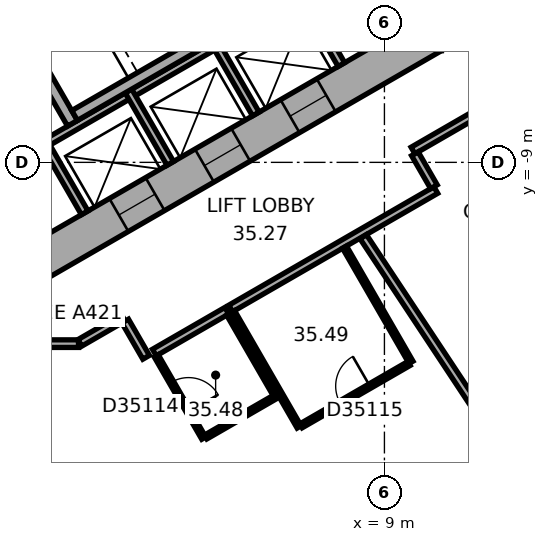
"""IFC4 building model, lengths in metres.
Left out: names, types, materials, properties, quantities, classifications, styles, units other than length and angle.
Written with IfcOpenShell. Run it as: python <this file> out.ifc"""

import sys

from ifc_helpers import new_model, si_unit, direction, frame, frame_2d, origin, place, context, subcontext, project, spatial, rectangle, extrude, element, fill, save


model = new_model("IFC4")
c1 = context("Model", 3, precision=1e-05, world=origin(), true_north=direction((0.0, 1.0)))
c2 = subcontext(c1, "Body", "Model", "MODEL_VIEW")
j1 = project(units=[si_unit("LENGTHUNIT", "METRE"), si_unit("PLANEANGLEUNIT", "RADIAN")], contexts=[c1])
p1 = place(None, origin())
s1 = spatial("IfcSite", under=j1, at=p1, CompositionType="ELEMENT")
p2 = place(p1, origin())
s2 = spatial("IfcBuilding", under=s1, at=p2, CompositionType="ELEMENT")
p3 = place(p2, frame((0.0, 0.0, 146.6)))
s3 = spatial("IfcBuildingStorey", under=s2, at=p3, CompositionType="ELEMENT", Elevation=146.6)
p4 = place(p3, frame((-10.25, -5.629, 0.0), z_axis=(0.0, 0.0, 1.0), x_axis=(0.866022616891, -0.50000482701, 0.0)))
e1 = element("IfcWall", 1, at=p4, inside=s3, PredefinedType="SHEAR", context=c2, shape_type="SweptSolid", body=[
    extrude(rectangle(XDim=12.125, YDim=1.0, at=frame_2d((6.062, 0.0))), origin(), (0.0, 0.0, 1.0), 3.7),
])
p5 = place(p4, frame((6.262, 0.0, 0.0)))
e2 = element("IfcOpeningElement", 2, at=p5, cuts=e1, PredefinedType="OPENING", context=c2, shape_type="SweptSolid", body=[
    extrude(rectangle(XDim=1.5, YDim=2.1, at=frame_2d((0.75, 1.05))), frame((0.0, 0.51, 0.0), z_axis=(0.0, -1.0, 0.0), x_axis=(1.0, 0.0, 0.0)), (0.0, 0.0, 1.0), 1.02),
])
p6 = place(p4, frame((1.712, 0.0, 0.0)))
e3 = element("IfcOpeningElement", 3, at=p6, cuts=e1, PredefinedType="OPENING", context=c2, shape_type="SweptSolid", body=[
    extrude(rectangle(XDim=1.1, YDim=2.1, at=frame_2d((0.55, 1.05))), frame((0.0, 0.51, 0.0), z_axis=(0.0, -1.0, 0.0), x_axis=(1.0, 0.0, 0.0)), (0.0, 0.0, 1.0), 1.02),
])
p7 = place(p4, frame((4.312, 0.0, 0.0)))
e4 = element("IfcOpeningElement", 4, at=p7, cuts=e1, PredefinedType="OPENING", context=c2, shape_type="SweptSolid", body=[
    extrude(rectangle(XDim=1.1, YDim=2.1, at=frame_2d((0.55, 1.05))), frame((0.0, 0.51, 0.0), z_axis=(0.0, -1.0, 0.0), x_axis=(1.0, 0.0, 0.0)), (0.0, 0.0, 1.0), 1.02),
])
p8 = place(p3, frame((-0.25, -11.691, 0.0), z_axis=(0.0, 0.0, 1.0), x_axis=(0.866022616891, 0.50000482701, 0.0)))
e5 = element("IfcWall", 5, at=p8, inside=s3, PredefinedType="SHEAR", context=c2, shape_type="SweptSolid", body=[
    extrude(rectangle(XDim=12.125, YDim=1.0, at=frame_2d((6.062, 0.0))), origin(), (0.0, 0.0, 1.0), 3.7),
])
p9 = place(p8, frame((2.612, 0.0, 0.0)))
e6 = element("IfcOpeningElement", 6, at=p9, cuts=e5, PredefinedType="OPENING", context=c2, shape_type="SweptSolid", body=[
    extrude(rectangle(XDim=1.1, YDim=2.1, at=frame_2d((0.55, 1.05))), frame((0.0, 0.51, 0.0), z_axis=(0.0, -1.0, 0.0), x_axis=(1.0, 0.0, 0.0)), (0.0, 0.0, 1.0), 1.02),
])
p10 = place(p8, frame((5.212, 0.0, 0.0)))
e7 = element("IfcOpeningElement", 7, at=p10, cuts=e5, PredefinedType="OPENING", context=c2, shape_type="SweptSolid", body=[
    extrude(rectangle(XDim=1.1, YDim=2.1, at=frame_2d((0.55, 1.05))), frame((0.0, 0.51, 0.0), z_axis=(0.0, -1.0, 0.0), x_axis=(1.0, 0.0, 0.0)), (0.0, 0.0, 1.0), 1.02),
])
p11 = place(p8, frame((7.812, 0.0, 0.0)))
e8 = element("IfcOpeningElement", 8, at=p11, cuts=e5, PredefinedType="OPENING", context=c2, shape_type="SweptSolid", body=[
    extrude(rectangle(XDim=1.1, YDim=2.1, at=frame_2d((0.55, 1.05))), frame((0.0, 0.51, 0.0), z_axis=(0.0, -1.0, 0.0), x_axis=(1.0, 0.0, 0.0)), (0.0, 0.0, 1.0), 1.02),
])
p12 = place(p3, frame((2.911, -24.156, 0.0), z_axis=(0.0, 0.0, 1.0), x_axis=(0.833882163564, 0.551942512668, 0.0)))
e9 = element("IfcWall", 9, at=p12, inside=s3, PredefinedType="STANDARD", context=c2, shape_type="SweptSolid", body=[
    extrude(rectangle(XDim=20.044, YDim=0.2, at=frame_2d((10.022, 0.0))), origin(), (0.0, 0.0, 1.0), 3.7),
])
p13 = place(p12, frame((1.313, 0.0, 0.9)))
e10 = element("IfcOpeningElement", 10, at=p13, cuts=e9, PredefinedType="OPENING", context=c2, shape_type="SweptSolid", body=[
    extrude(rectangle(XDim=2.4, YDim=2.0, at=frame_2d((1.2, 1.0))), frame((0.0, 0.11, 0.0), z_axis=(0.0, -1.0, 0.0), x_axis=(1.0, 0.0, 0.0)), (0.0, 0.0, 1.0), 0.22),
])
p14 = place(p12, frame((5.067, 0.0, 0.9)))
e11 = element("IfcOpeningElement", 11, at=p14, cuts=e9, PredefinedType="OPENING", context=c2, shape_type="SweptSolid", body=[
    extrude(rectangle(XDim=2.4, YDim=2.0, at=frame_2d((1.2, 1.0))), frame((0.0, 0.11, 0.0), z_axis=(0.0, -1.0, 0.0), x_axis=(1.0, 0.0, 0.0)), (0.0, 0.0, 1.0), 0.22),
])
p15 = place(p12, frame((8.821, 0.0, 0.9)))
e12 = element("IfcOpeningElement", 12, at=p15, cuts=e9, PredefinedType="OPENING", context=c2, shape_type="SweptSolid", body=[
    extrude(rectangle(XDim=2.4, YDim=2.0, at=frame_2d((1.2, 1.0))), frame((0.0, 0.11, 0.0), z_axis=(0.0, -1.0, 0.0), x_axis=(1.0, 0.0, 0.0)), (0.0, 0.0, 1.0), 0.22),
])
p16 = place(p12, frame((12.575, 0.0, 0.9)))
e13 = element("IfcOpeningElement", 13, at=p16, cuts=e9, PredefinedType="OPENING", context=c2, shape_type="SweptSolid", body=[
    extrude(rectangle(XDim=2.4, YDim=2.0, at=frame_2d((1.2, 1.0))), frame((0.0, 0.11, 0.0), z_axis=(0.0, -1.0, 0.0), x_axis=(1.0, 0.0, 0.0)), (0.0, 0.0, 1.0), 0.22),
])
p17 = place(p12, frame((16.329, 0.0, 0.9)))
e14 = element("IfcOpeningElement", 14, at=p17, cuts=e9, PredefinedType="OPENING", context=c2, shape_type="SweptSolid", body=[
    extrude(rectangle(XDim=2.4, YDim=2.0, at=frame_2d((1.2, 1.0))), frame((0.0, 0.11, 0.0), z_axis=(0.0, -1.0, 0.0), x_axis=(1.0, 0.0, 0.0)), (0.0, 0.0, 1.0), 0.22),
])
p18 = place(p3, frame((-0.024, -8.559, 0.0), z_axis=(0.0, 0.0, 1.0), x_axis=(0.866026010844, 0.49999894854, 0.0)))
e15 = element("IfcWall", 15, at=p18, inside=s3, PredefinedType="PARTITIONING", context=c2, shape_type="SweptSolid", body=[
    extrude(rectangle(XDim=8.0, YDim=0.2, at=frame_2d((4.0, 0.0))), origin(), (0.0, 0.0, 1.0), 3.42),
])
for number, where, z_axis, x_axis in (
    (16, (0.013, -8.422, 0.0), (0.0, 0.0, 1.0), (0.5, -0.866, 0.0)),
    (17, (2.264, -7.122, 0.0), (0.0, 0.0, 1.0), (0.5, -0.866, 0.0)),
    (18, (4.516, -5.822, 0.0), (0.0, 0.0, 1.0), (0.5, -0.866, 0.0)),
    (19, (6.768, -4.522, 0.0), (0.0, 0.0, 1.0), (0.5, -0.866, 0.0)),
):
    element("IfcWall", number, at=place(p3, frame(where, z_axis=z_axis, x_axis=x_axis)), inside=s3, PredefinedType="PARTITIONING", context=c2, shape_type="SweptSolid", body=[
        extrude(rectangle(XDim=2.2, YDim=0.2, at=frame_2d((1.1, 0.0))), origin(), (0.0, 0.0, 1.0), 3.42),
    ])
p19 = place(p3, frame((-1.558, -3.902, 0.0), z_axis=(0.0, 0.0, 1.0), x_axis=(0.499977259774, -0.866038532462, 0.0)))
e20 = element("IfcWall", 20, at=p19, inside=s3, PredefinedType="SHEAR", context=c2, shape_type="SweptSolid", body=[
    extrude(rectangle(XDim=4.7, YDim=0.3, at=frame_2d((2.35, 0.0))), origin(), (0.0, 0.0, 1.0), 3.42),
])
p20 = place(p19, frame((0.8, 0.0, 0.0)))
e21 = element("IfcOpeningElement", 21, at=p20, cuts=e20, PredefinedType="OPENING", context=c2, shape_type="SweptSolid", body=[
    extrude(rectangle(XDim=1.2, YDim=2.1, at=frame_2d((0.6, 1.05))), frame((0.0, 0.16, 0.0), z_axis=(0.0, -1.0, 0.0), x_axis=(1.0, 0.0, 0.0)), (0.0, 0.0, 1.0), 0.32),
])
p21 = place(p3, frame((0.847, -7.767, 0.0), z_axis=(0.0, 0.0, 1.0), x_axis=(0.866027801685, 0.499995846692, 0.0)))
e22 = element("IfcWall", 22, at=p21, inside=s3, PredefinedType="SHEAR", context=c2, shape_type="SweptSolid", body=[
    extrude(rectangle(XDim=7.06, YDim=0.3, at=frame_2d((3.53, 0.0))), origin(), (0.0, 0.0, 1.0), 3.42),
])
p22 = place(p3, frame((-0.91, -13.77, 0.0), z_axis=(0.0, 0.0, 1.0), x_axis=(1.0, 0.0, 0.0)))
e23 = element("IfcWall", 23, at=p22, inside=s3, PredefinedType="PARTITIONING", context=c2, shape_type="SweptSolid", body=[
    extrude(rectangle(XDim=1.86, YDim=0.2, at=frame_2d((0.93, 0.0))), origin(), (0.0, 0.0, 1.0), 3.42),
])
p23 = place(p3, frame((0.985, -13.75, 0.0), z_axis=(0.0, 0.0, 1.0), x_axis=(0.866028661061, 0.499994358189, 0.0)))
e24 = element("IfcWall", 24, at=p23, inside=s3, PredefinedType="PARTITIONING", context=c2, shape_type="SweptSolid", body=[
    extrude(rectangle(XDim=1.321, YDim=0.2, at=frame_2d((0.661, 0.0))), origin(), (0.0, 0.0, 1.0), 3.42),
])
p24 = place(p3, frame((2.179, -13.176, 0.0), z_axis=(0.0, 0.0, 1.0), x_axis=(0.499978356969, -0.866037899034, 0.0)))
e25 = element("IfcWall", 25, at=p24, inside=s3, PredefinedType="PARTITIONING", context=c2, shape_type="SweptSolid", body=[
    extrude(rectangle(XDim=1.101, YDim=0.2, at=frame_2d((0.551, 0.0))), origin(), (0.0, 0.0, 1.0), 3.42),
])
p25 = place(p3, frame((2.946, -14.004, 0.0), z_axis=(0.0, 0.0, 1.0), x_axis=(0.866008176907, 0.50002983664, 0.0)))
e26 = element("IfcWall", 26, at=p25, inside=s3, PredefinedType="PARTITIONING", context=c2, shape_type="SweptSolid", body=[
    extrude(rectangle(XDim=2.2, YDim=0.2, at=frame_2d((1.1, 0.0))), origin(), (0.0, 0.0, 1.0), 3.42),
])
p26 = place(p3, frame((4.246, -16.256, 0.0), z_axis=(0.0, 0.0, 1.0), x_axis=(-0.499961950354, 0.866047370643, 0.0)))
e27 = element("IfcWall", 27, at=p26, inside=s3, PredefinedType="PARTITIONING", context=c2, shape_type="SweptSolid", body=[
    extrude(rectangle(XDim=2.5, YDim=0.12, at=frame_2d((1.25, 0.0))), origin(), (0.0, 0.0, 1.0), 3.42),
])
p27 = place(p26, frame((0.8, 0.0, 0.0)))
e28 = element("IfcOpeningElement", 28, at=p27, cuts=e27, PredefinedType="OPENING", context=c2, shape_type="SweptSolid", body=[
    extrude(rectangle(XDim=0.9, YDim=2.1, at=frame_2d((0.45, 1.05))), frame((0.0, 0.07, 0.0), z_axis=(0.0, -1.0, 0.0), x_axis=(1.0, 0.0, 0.0)), (0.0, 0.0, 1.0), 0.14),
])
p28 = place(p3, frame((4.901, -12.991, 0.0), z_axis=(0.0, 0.0, 1.0), x_axis=(0.500004234368, -0.866022959057, 0.0)))
e29 = element("IfcWall", 29, at=p28, inside=s3, PredefinedType="PARTITIONING", context=c2, shape_type="SweptSolid", body=[
    extrude(rectangle(XDim=2.5, YDim=0.12, at=frame_2d((1.25, 0.0))), origin(), (0.0, 0.0, 1.0), 3.42),
])
p29 = place(p3, frame((4.955, -12.844, 0.0), z_axis=(0.0, 0.0, 1.0), x_axis=(0.86602379309, 0.500002789795, 0.0)))
e30 = element("IfcWall", 30, at=p29, inside=s3, PredefinedType="PARTITIONING", context=c2, shape_type="SweptSolid", body=[
    extrude(rectangle(XDim=6.232, YDim=0.2, at=frame_2d((3.116, 0.0))), origin(), (0.0, 0.0, 1.0), 3.42),
])
p30 = place(p3, frame((6.099, -15.186, 0.0), z_axis=(0.0, 0.0, 1.0), x_axis=(-0.866009661879, -0.500027264788, 0.0)))
e31 = element("IfcWall", 31, at=p30, inside=s3, PredefinedType="PARTITIONING", context=c2, shape_type="SweptSolid", body=[
    extrude(rectangle(XDim=2.08, YDim=0.12, at=frame_2d((1.04, 0.0))), origin(), (0.0, 0.0, 1.0), 3.42),
])
for number, where, z_axis, x_axis in (
    (32, (6.755, -15.962, 0.0), (0.0, 0.0, 1.0), (-0.5, 0.866, 0.0)),
    (33, (7.949, -11.231, 0.0), (0.0, 0.0, 1.0), (0.5, -0.866, 0.0)),
):
    element("IfcWall", number, at=place(p3, frame(where, z_axis=z_axis, x_axis=x_axis)), inside=s3, PredefinedType="PARTITIONING", context=c2, shape_type="SweptSolid", body=[
        extrude(rectangle(XDim=3.5, YDim=0.12, at=frame_2d((1.75, 0.0))), origin(), (0.0, 0.0, 1.0), 3.42),
    ])
p31 = place(p3, frame((9.647, -14.292, 0.0), z_axis=(0.0, 0.0, 1.0), x_axis=(-0.866040564224, -0.499973740429, 0.0)))
e34 = element("IfcWall", 34, at=p31, inside=s3, PredefinedType="PARTITIONING", context=c2, shape_type="SweptSolid", body=[
    extrude(rectangle(XDim=3.28, YDim=0.12, at=frame_2d((1.64, 0.0))), origin(), (0.0, 0.0, 1.0), 3.42),
])
p32 = place(p31, frame((1.19, 0.0, 0.0)))
e35 = element("IfcOpeningElement", 35, at=p32, cuts=e34, PredefinedType="OPENING", context=c2, shape_type="SweptSolid", body=[
    extrude(rectangle(XDim=0.9, YDim=2.1, at=frame_2d((0.45, 1.05))), frame((0.0, 0.07, 0.0), z_axis=(0.0, -1.0, 0.0), x_axis=(1.0, 0.0, 0.0)), (0.0, 0.0, 1.0), 0.14),
])
p33 = place(p3, frame((9.752, -8.688, 0.0), z_axis=(0.0, 0.0, 1.0), x_axis=(0.865974105138, 0.500088841337, 0.0)))
e36 = element("IfcWall", 36, at=p33, inside=s3, PredefinedType="PARTITIONING", context=c2, shape_type="SweptSolid", body=[
    extrude(rectangle(XDim=1.961, YDim=0.2, at=frame_2d((0.98, 0.0))), origin(), (0.0, 0.0, 1.0), 3.42),
])
p34 = place(p3, frame((10.302, -9.642, 0.0), z_axis=(0.0, 0.0, 1.0), x_axis=(-0.500074377092, 0.865982457891, 0.0)))
e37 = element("IfcWall", 37, at=p34, inside=s3, PredefinedType="PARTITIONING", context=c2, shape_type="SweptSolid", body=[
    extrude(rectangle(XDim=1.001, YDim=0.2, at=frame_2d((0.5, 0.0))), origin(), (0.0, 0.0, 1.0), 3.42),
])
p35 = place(p3, frame((12.281, -16.755, 0.0), z_axis=(0.0, 0.0, 1.0), x_axis=(-0.551925794663, 0.833893228888, 0.0)))
e38 = element("IfcWall", 38, at=p35, inside=s3, PredefinedType="PARTITIONING", context=c2, shape_type="SweptSolid", body=[
    extrude(rectangle(XDim=6.953, YDim=0.2, at=frame_2d((3.476, 0.0))), origin(), (0.0, 0.0, 1.0), 3.42),
])
p36 = place(p9, origin())
e39 = element("IfcDoor", 39, at=p36, inside=s3, OperationType="DOUBLE_DOOR_SLIDING", PredefinedType="DOOR", context=c2, shape_type="SweptSolid", body=[
    extrude(rectangle(XDim=1.1, YDim=2.1, at=frame_2d((0.55, 1.05))), frame((0.0, 0.025, 0.0), z_axis=(0.0, -1.0, 0.0), x_axis=(1.0, 0.0, 0.0)), (0.0, 0.0, 1.0), 0.05),
])
fill(e6, e39)
p37 = place(p10, origin())
e40 = element("IfcDoor", 40, at=p37, inside=s3, OperationType="DOUBLE_DOOR_SLIDING", PredefinedType="DOOR", context=c2, shape_type="SweptSolid", body=[
    extrude(rectangle(XDim=1.1, YDim=2.1, at=frame_2d((0.55, 1.05))), frame((0.0, 0.025, 0.0), z_axis=(0.0, -1.0, 0.0), x_axis=(1.0, 0.0, 0.0)), (0.0, 0.0, 1.0), 0.05),
])
fill(e7, e40)
p38 = place(p11, origin())
e41 = element("IfcDoor", 41, at=p38, inside=s3, OperationType="DOUBLE_DOOR_SLIDING", PredefinedType="DOOR", context=c2, shape_type="SweptSolid", body=[
    extrude(rectangle(XDim=1.1, YDim=2.1, at=frame_2d((0.55, 1.05))), frame((0.0, 0.025, 0.0), z_axis=(0.0, -1.0, 0.0), x_axis=(1.0, 0.0, 0.0)), (0.0, 0.0, 1.0), 0.05),
])
fill(e8, e41)
p39 = place(p27, origin())
e42 = element("IfcDoor", 42, at=p39, inside=s3, OperationType="SINGLE_SWING_LEFT", PredefinedType="DOOR", context=c2, shape_type="SweptSolid", body=[
    extrude(rectangle(XDim=0.9, YDim=2.1, at=frame_2d((0.45, 1.05))), frame((0.0, 0.025, 0.0), z_axis=(0.0, -1.0, 0.0), x_axis=(1.0, 0.0, 0.0)), (0.0, 0.0, 1.0), 0.05),
])
fill(e28, e42)
p40 = place(p32, origin())
e43 = element("IfcDoor", 43, at=p40, inside=s3, OperationType="SINGLE_SWING_LEFT", PredefinedType="DOOR", context=c2, shape_type="SweptSolid", body=[
    extrude(rectangle(XDim=0.9, YDim=2.1, at=frame_2d((0.45, 1.05))), frame((0.0, 0.025, 0.0), z_axis=(0.0, -1.0, 0.0), x_axis=(1.0, 0.0, 0.0)), (0.0, 0.0, 1.0), 0.05),
])
fill(e35, e43)
save(model, sys.argv[1])
